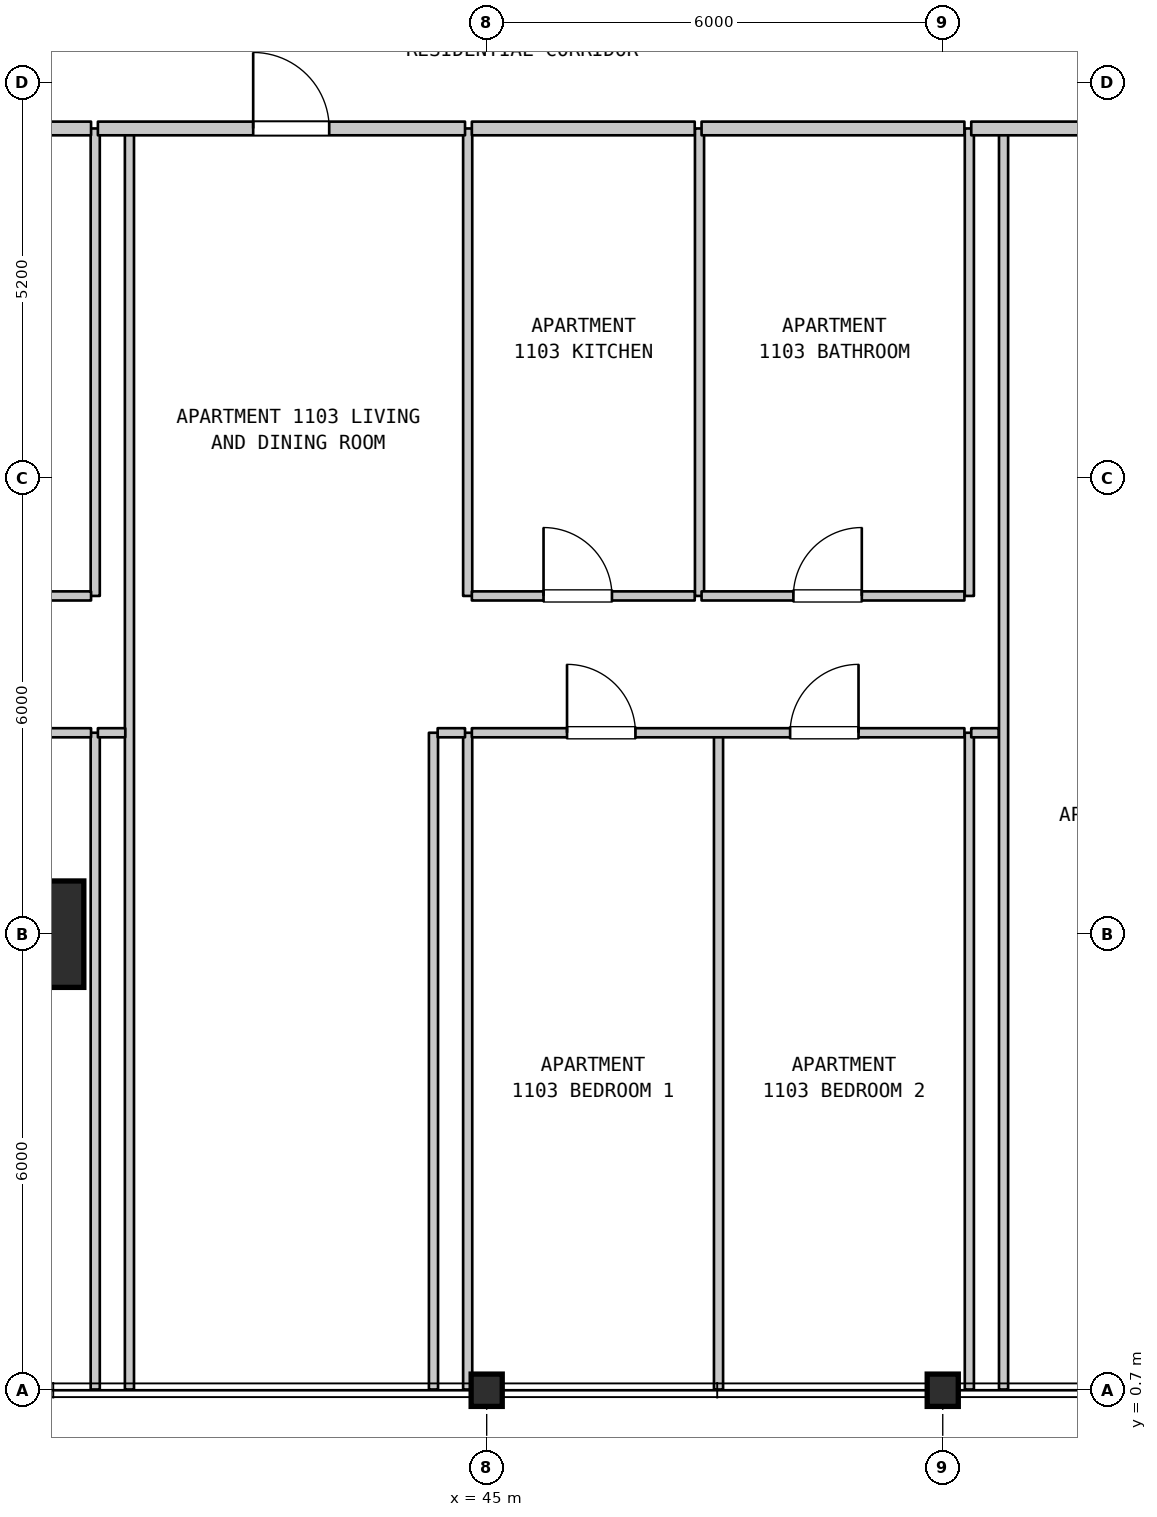
"""IFC4 building model, lengths in metres.
Left out: names, types, materials, properties, quantities, classifications, styles, units other than length and angle.
Written with IfcOpenShell. Run it as: python <this file> out.ifc"""

import sys

from ifc_helpers import new_model, si_unit, direction, frame, frame_2d, origin, origin_2d, place, context, subcontext, project, spatial, rectangle, i_section, extrude, element, fill, save


model = new_model("IFC4")
c1 = context("Model", 3, precision=1e-05, world=origin(), true_north=direction((0.0, 1.0)))
c2 = subcontext(c1, "Body", "Model", "MODEL_VIEW")
j1 = project(units=[si_unit("LENGTHUNIT", "METRE"), si_unit("PLANEANGLEUNIT", "RADIAN")], contexts=[c1])
p1 = place(None, origin())
s1 = spatial("IfcSite", under=j1, at=p1, CompositionType="ELEMENT")
p2 = place(p1, origin())
s2 = spatial("IfcBuilding", under=s1, at=p2, CompositionType="ELEMENT")
p3 = place(p2, frame((0.0, 0.0, 49.9)))
s3 = spatial("IfcBuildingStorey", under=s2, at=p3, CompositionType="ELEMENT", Elevation=49.9)
p4 = place(p3, frame((39.0, 6.7, 0.0), z_axis=(0.0, 0.0, 1.0), x_axis=(1.0, 0.0, 0.0)))
e1 = element("IfcColumn", 1, at=p4, inside=s3, PredefinedType="COLUMN", context=c2, shape_type="SweptSolid", body=[
    extrude(rectangle(XDim=1.4, YDim=1.4, at=origin_2d()), origin(), (0.0, 0.0, 1.0), 3.7),
])
for number, where, z_axis, x_axis in (
    (2, (45.0, 0.7, 0.0), (0.0, 0.0, 1.0), (1.0, 0.0, 0.0)),
    (3, (51.0, 0.7, 0.0), (0.0, 0.0, 1.0), (1.0, 0.0, 0.0)),
):
    element("IfcColumn", number, at=place(p3, frame(where, z_axis=z_axis, x_axis=x_axis)), inside=s3, PredefinedType="COLUMN", context=c2, shape_type="SweptSolid", body=[
        extrude(i_section(OverallWidth=0.409, OverallDepth=0.425, WebThickness=0.032, FlangeThickness=0.052, FilletRadius=0.015, at=origin_2d()), origin(), (0.0, 0.0, 1.0), 3.7),
    ])
p5 = place(p3, frame((39.85, 0.71, 0.0), z_axis=(0.0, 0.0, 1.0), x_axis=(0.0, 1.0, 0.0)))
e4 = element("IfcWall", 4, at=p5, inside=s3, PredefinedType="PARTITIONING", context=c2, shape_type="SweptSolid", body=[
    extrude(rectangle(XDim=8.64, YDim=0.12, at=frame_2d((4.32, 0.0))), origin(), (0.0, 0.0, 1.0), 3.385),
])
p6 = place(p3, frame((39.85, 11.15, 0.0), z_axis=(0.0, 0.0, 1.0), x_axis=(0.0, 1.0, 0.0)))
e5 = element("IfcWall", 5, at=p6, inside=s3, PredefinedType="PARTITIONING", context=c2, shape_type="SweptSolid", body=[
    extrude(rectangle(XDim=6.15, YDim=0.12, at=frame_2d((3.075, 0.0))), origin(), (0.0, 0.0, 1.0), 3.385),
])
p7 = place(p3, frame((40.3, 0.71, 0.0), z_axis=(0.0, 0.0, 1.0), x_axis=(0.0, 1.0, 0.0)))
e6 = element("IfcWall", 6, at=p7, inside=s3, PredefinedType="PARTITIONING", context=c2, shape_type="SweptSolid", body=[
    extrude(rectangle(XDim=16.59, YDim=0.12, at=frame_2d((8.295, 0.0))), origin(), (0.0, 0.0, 1.0), 3.385),
])
for number, where, z_axis, x_axis in (
    (7, (44.3, 0.71, 0.0), (0.0, 0.0, 1.0), (0.0, 1.0, 0.0)),
    (8, (44.75, 0.71, 0.0), (0.0, 0.0, 1.0), (0.0, 1.0, 0.0)),
):
    element("IfcWall", number, at=place(p3, frame(where, z_axis=z_axis, x_axis=x_axis)), inside=s3, PredefinedType="PARTITIONING", context=c2, shape_type="SweptSolid", body=[
        extrude(rectangle(XDim=8.64, YDim=0.12, at=frame_2d((4.32, 0.0))), origin(), (0.0, 0.0, 1.0), 3.385),
    ])
for number, where, z_axis, x_axis in (
    (9, (44.75, 11.15, 0.0), (0.0, 0.0, 1.0), (0.0, 1.0, 0.0)),
    (10, (47.8, 11.15, 0.0), (0.0, 0.0, 1.0), (0.0, 1.0, 0.0)),
):
    element("IfcWall", number, at=place(p3, frame(where, z_axis=z_axis, x_axis=x_axis)), inside=s3, PredefinedType="PARTITIONING", context=c2, shape_type="SweptSolid", body=[
        extrude(rectangle(XDim=6.15, YDim=0.12, at=frame_2d((3.075, 0.0))), origin(), (0.0, 0.0, 1.0), 3.385),
    ])
for number, where, z_axis, x_axis in (
    (11, (48.05, 0.71, 0.0), (0.0, 0.0, 1.0), (0.0, 1.0, 0.0)),
    (12, (51.35, 0.71, 0.0), (0.0, 0.0, 1.0), (0.0, 1.0, 0.0)),
):
    element("IfcWall", number, at=place(p3, frame(where, z_axis=z_axis, x_axis=x_axis)), inside=s3, PredefinedType="PARTITIONING", context=c2, shape_type="SweptSolid", body=[
        extrude(rectangle(XDim=8.64, YDim=0.12, at=frame_2d((4.32, 0.0))), origin(), (0.0, 0.0, 1.0), 3.385),
    ])
p8 = place(p3, frame((51.35, 11.15, 0.0), z_axis=(0.0, 0.0, 1.0), x_axis=(0.0, 1.0, 0.0)))
e13 = element("IfcWall", 13, at=p8, inside=s3, PredefinedType="PARTITIONING", context=c2, shape_type="SweptSolid", body=[
    extrude(rectangle(XDim=6.15, YDim=0.12, at=frame_2d((3.075, 0.0))), origin(), (0.0, 0.0, 1.0), 3.385),
])
p9 = place(p3, frame((51.8, 0.71, 0.0), z_axis=(0.0, 0.0, 1.0), x_axis=(0.0, 1.0, 0.0)))
e14 = element("IfcWall", 14, at=p9, inside=s3, PredefinedType="PARTITIONING", context=c2, shape_type="SweptSolid", body=[
    extrude(rectangle(XDim=16.59, YDim=0.12, at=frame_2d((8.295, 0.0))), origin(), (0.0, 0.0, 1.0), 3.385),
])
p10 = place(p3, frame((33.315, 9.35, 0.0), z_axis=(0.0, 0.0, 1.0), x_axis=(1.0, 0.0, 0.0)))
e15 = element("IfcWall", 15, at=p10, inside=s3, PredefinedType="PARTITIONING", context=c2, shape_type="SweptSolid", body=[
    extrude(rectangle(XDim=6.48, YDim=0.12, at=frame_2d((3.24, 0.0))), origin(), (0.0, 0.0, 1.0), 3.385),
])
p11 = place(p10, frame((1.252, 0.0, 0.0)))
e16 = element("IfcOpeningElement", 16, at=p11, cuts=e15, PredefinedType="OPENING", context=c2, shape_type="SweptSolid", body=[
    extrude(rectangle(XDim=0.9, YDim=2.15, at=frame_2d((0.45, 1.075))), frame((0.0, 0.07, 0.0), z_axis=(0.0, -1.0, 0.0), x_axis=(1.0, 0.0, 0.0)), (0.0, 0.0, 1.0), 0.14),
])
p12 = place(p10, frame((4.187, 0.0, 0.0)))
e17 = element("IfcOpeningElement", 17, at=p12, cuts=e15, PredefinedType="OPENING", context=c2, shape_type="SweptSolid", body=[
    extrude(rectangle(XDim=0.9, YDim=2.15, at=frame_2d((0.45, 1.075))), frame((0.0, 0.07, 0.0), z_axis=(0.0, -1.0, 0.0), x_axis=(1.0, 0.0, 0.0)), (0.0, 0.0, 1.0), 0.14),
])
for number, where, z_axis, x_axis in (
    (18, (39.885, 9.35, 0.0), (0.0, 0.0, 1.0), (1.0, 0.0, 0.0)),
    (19, (44.355, 9.35, 0.0), (0.0, 0.0, 1.0), (1.0, 0.0, 0.0)),
):
    element("IfcWall", number, at=place(p3, frame(where, z_axis=z_axis, x_axis=x_axis)), inside=s3, PredefinedType="PARTITIONING", context=c2, shape_type="SweptSolid", body=[
        extrude(rectangle(XDim=0.36, YDim=0.12, at=frame_2d((0.18, 0.0))), origin(), (0.0, 0.0, 1.0), 3.385),
    ])
p13 = place(p3, frame((44.805, 9.35, 0.0), z_axis=(0.0, 0.0, 1.0), x_axis=(1.0, 0.0, 0.0)))
e20 = element("IfcWall", 20, at=p13, inside=s3, PredefinedType="PARTITIONING", context=c2, shape_type="SweptSolid", body=[
    extrude(rectangle(XDim=6.48, YDim=0.12, at=frame_2d((3.24, 0.0))), origin(), (0.0, 0.0, 1.0), 3.385),
])
p14 = place(p13, frame((1.252, 0.0, 0.0)))
e21 = element("IfcOpeningElement", 21, at=p14, cuts=e20, PredefinedType="OPENING", context=c2, shape_type="SweptSolid", body=[
    extrude(rectangle(XDim=0.9, YDim=2.15, at=frame_2d((0.45, 1.075))), frame((0.0, 0.07, 0.0), z_axis=(0.0, -1.0, 0.0), x_axis=(1.0, 0.0, 0.0)), (0.0, 0.0, 1.0), 0.14),
])
p15 = place(p13, frame((4.187, 0.0, 0.0)))
e22 = element("IfcOpeningElement", 22, at=p15, cuts=e20, PredefinedType="OPENING", context=c2, shape_type="SweptSolid", body=[
    extrude(rectangle(XDim=0.9, YDim=2.15, at=frame_2d((0.45, 1.075))), frame((0.0, 0.07, 0.0), z_axis=(0.0, -1.0, 0.0), x_axis=(1.0, 0.0, 0.0)), (0.0, 0.0, 1.0), 0.14),
])
p16 = place(p3, frame((51.375, 9.35, 0.0), z_axis=(0.0, 0.0, 1.0), x_axis=(1.0, 0.0, 0.0)))
e23 = element("IfcWall", 23, at=p16, inside=s3, PredefinedType="PARTITIONING", context=c2, shape_type="SweptSolid", body=[
    extrude(rectangle(XDim=0.36, YDim=0.12, at=frame_2d((0.18, 0.0))), origin(), (0.0, 0.0, 1.0), 3.385),
])
p17 = place(p3, frame((36.337, 11.15, 0.0), z_axis=(0.0, 0.0, 1.0), x_axis=(1.0, 0.0, 0.0)))
e24 = element("IfcWall", 24, at=p17, inside=s3, PredefinedType="PARTITIONING", context=c2, shape_type="SweptSolid", body=[
    extrude(rectangle(XDim=3.458, YDim=0.12, at=frame_2d((1.729, 0.0))), origin(), (0.0, 0.0, 1.0), 3.385),
])
p18 = place(p17, frame((1.208, 0.0, 0.0)))
e25 = element("IfcOpeningElement", 25, at=p18, cuts=e24, PredefinedType="OPENING", context=c2, shape_type="SweptSolid", body=[
    extrude(rectangle(XDim=0.9, YDim=2.1, at=frame_2d((0.45, 1.05))), frame((0.0, 0.07, 0.0), z_axis=(0.0, -1.0, 0.0), x_axis=(1.0, 0.0, 0.0)), (0.0, 0.0, 1.0), 0.14),
])
p19 = place(p3, frame((44.805, 11.15, 0.0), z_axis=(0.0, 0.0, 1.0), x_axis=(1.0, 0.0, 0.0)))
e26 = element("IfcWall", 26, at=p19, inside=s3, PredefinedType="PARTITIONING", context=c2, shape_type="SweptSolid", body=[
    extrude(rectangle(XDim=2.932, YDim=0.12, at=frame_2d((1.466, 0.0))), origin(), (0.0, 0.0, 1.0), 3.385),
])
p20 = place(p19, frame((0.943, 0.0, 0.0)))
e27 = element("IfcOpeningElement", 27, at=p20, cuts=e26, PredefinedType="OPENING", context=c2, shape_type="SweptSolid", body=[
    extrude(rectangle(XDim=0.9, YDim=2.15, at=frame_2d((0.45, 1.075))), frame((0.0, 0.07, 0.0), z_axis=(0.0, -1.0, 0.0), x_axis=(1.0, 0.0, 0.0)), (0.0, 0.0, 1.0), 0.14),
])
p21 = place(p3, frame((47.827, 11.15, 0.0), z_axis=(0.0, 0.0, 1.0), x_axis=(1.0, 0.0, 0.0)))
e28 = element("IfcWall", 28, at=p21, inside=s3, PredefinedType="PARTITIONING", context=c2, shape_type="SweptSolid", body=[
    extrude(rectangle(XDim=3.458, YDim=0.12, at=frame_2d((1.729, 0.0))), origin(), (0.0, 0.0, 1.0), 3.385),
])
p22 = place(p21, frame((1.208, 0.0, 0.0)))
e29 = element("IfcOpeningElement", 29, at=p22, cuts=e28, PredefinedType="OPENING", context=c2, shape_type="SweptSolid", body=[
    extrude(rectangle(XDim=0.9, YDim=2.1, at=frame_2d((0.45, 1.05))), frame((0.0, 0.07, 0.0), z_axis=(0.0, -1.0, 0.0), x_axis=(1.0, 0.0, 0.0)), (0.0, 0.0, 1.0), 0.14),
])
p23 = place(p3, frame((36.337, 17.3, 0.0), z_axis=(0.0, 0.0, 1.0), x_axis=(1.0, 0.0, 0.0)))
e30 = element("IfcWall", 30, at=p23, inside=s3, PredefinedType="STANDARD", context=c2, shape_type="SweptSolid", body=[
    extrude(rectangle(XDim=3.458, YDim=0.18, at=frame_2d((1.729, 0.0))), origin(), (0.0, 0.0, 1.0), 3.385),
])
p24 = place(p3, frame((39.885, 17.3, 0.0), z_axis=(0.0, 0.0, 1.0), x_axis=(1.0, 0.0, 0.0)))
e31 = element("IfcWall", 31, at=p24, inside=s3, PredefinedType="STANDARD", context=c2, shape_type="SweptSolid", body=[
    extrude(rectangle(XDim=4.83, YDim=0.18, at=frame_2d((2.415, 0.0))), origin(), (0.0, 0.0, 1.0), 3.385),
])
p25 = place(p24, frame((2.043, 0.0, 0.0)))
e32 = element("IfcOpeningElement", 32, at=p25, cuts=e31, PredefinedType="OPENING", context=c2, shape_type="SweptSolid", body=[
    extrude(rectangle(XDim=1.0, YDim=2.15, at=frame_2d((0.5, 1.075))), frame((0.0, 0.1, 0.0), z_axis=(0.0, -1.0, 0.0), x_axis=(1.0, 0.0, 0.0)), (0.0, 0.0, 1.0), 0.2),
])
p26 = place(p3, frame((44.805, 17.3, 0.0), z_axis=(0.0, 0.0, 1.0), x_axis=(1.0, 0.0, 0.0)))
e33 = element("IfcWall", 33, at=p26, inside=s3, PredefinedType="STANDARD", context=c2, shape_type="SweptSolid", body=[
    extrude(rectangle(XDim=2.932, YDim=0.18, at=frame_2d((1.466, 0.0))), origin(), (0.0, 0.0, 1.0), 3.385),
])
p27 = place(p3, frame((47.827, 17.3, 0.0), z_axis=(0.0, 0.0, 1.0), x_axis=(1.0, 0.0, 0.0)))
e34 = element("IfcWall", 34, at=p27, inside=s3, PredefinedType="STANDARD", context=c2, shape_type="SweptSolid", body=[
    extrude(rectangle(XDim=3.458, YDim=0.18, at=frame_2d((1.729, 0.0))), origin(), (0.0, 0.0, 1.0), 3.385),
])
p28 = place(p3, frame((51.375, 17.3, 0.0), z_axis=(0.0, 0.0, 1.0), x_axis=(1.0, 0.0, 0.0)))
e35 = element("IfcWall", 35, at=p28, inside=s3, PredefinedType="STANDARD", context=c2, shape_type="SweptSolid", body=[
    extrude(rectangle(XDim=3.96, YDim=0.18, at=frame_2d((1.98, 0.0))), origin(), (0.0, 0.0, 1.0), 3.385),
])
p29 = place(p28, frame((1.609, 0.0, 0.0)))
e36 = element("IfcOpeningElement", 36, at=p29, cuts=e35, PredefinedType="OPENING", context=c2, shape_type="SweptSolid", body=[
    extrude(rectangle(XDim=1.0, YDim=2.15, at=frame_2d((0.5, 1.075))), frame((0.0, 0.1, 0.0), z_axis=(0.0, -1.0, 0.0), x_axis=(1.0, 0.0, 0.0)), (0.0, 0.0, 1.0), 0.2),
])
p30 = place(p14, origin())
e37 = element("IfcDoor", 37, at=p30, inside=s3, OperationType="SINGLE_SWING_LEFT", PredefinedType="DOOR", context=c2, shape_type="SweptSolid", body=[
    extrude(rectangle(XDim=0.9, YDim=2.15, at=frame_2d((0.45, 1.075))), frame((0.0, 0.025, 0.0), z_axis=(0.0, -1.0, 0.0), x_axis=(1.0, 0.0, 0.0)), (0.0, 0.0, 1.0), 0.05),
])
fill(e21, e37)
p31 = place(p15, origin())
e38 = element("IfcDoor", 38, at=p31, inside=s3, OperationType="SINGLE_SWING_RIGHT", PredefinedType="DOOR", context=c2, shape_type="SweptSolid", body=[
    extrude(rectangle(XDim=0.9, YDim=2.15, at=frame_2d((0.45, 1.075))), frame((0.0, 0.025, 0.0), z_axis=(0.0, -1.0, 0.0), x_axis=(1.0, 0.0, 0.0)), (0.0, 0.0, 1.0), 0.05),
])
fill(e22, e38)
p32 = place(p20, origin())
e39 = element("IfcDoor", 39, at=p32, inside=s3, OperationType="SINGLE_SWING_LEFT", PredefinedType="DOOR", context=c2, shape_type="SweptSolid", body=[
    extrude(rectangle(XDim=0.9, YDim=2.15, at=frame_2d((0.45, 1.075))), frame((0.0, 0.025, 0.0), z_axis=(0.0, -1.0, 0.0), x_axis=(1.0, 0.0, 0.0)), (0.0, 0.0, 1.0), 0.05),
])
fill(e27, e39)
p33 = place(p22, origin())
e40 = element("IfcDoor", 40, at=p33, inside=s3, OperationType="SINGLE_SWING_RIGHT", PredefinedType="DOOR", context=c2, shape_type="SweptSolid", body=[
    extrude(rectangle(XDim=0.9, YDim=2.1, at=frame_2d((0.45, 1.05))), frame((0.0, 0.025, 0.0), z_axis=(0.0, -1.0, 0.0), x_axis=(1.0, 0.0, 0.0)), (0.0, 0.0, 1.0), 0.05),
])
fill(e29, e40)
p34 = place(p25, origin())
e41 = element("IfcDoor", 41, at=p34, inside=s3, OperationType="SINGLE_SWING_LEFT", PredefinedType="DOOR", context=c2, shape_type="SweptSolid", body=[
    extrude(rectangle(XDim=1.0, YDim=2.15, at=frame_2d((0.5, 1.075))), frame((0.0, 0.025, 0.0), z_axis=(0.0, -1.0, 0.0), x_axis=(1.0, 0.0, 0.0)), (0.0, 0.0, 1.0), 0.05),
])
fill(e32, e41)
save(model, sys.argv[1])
